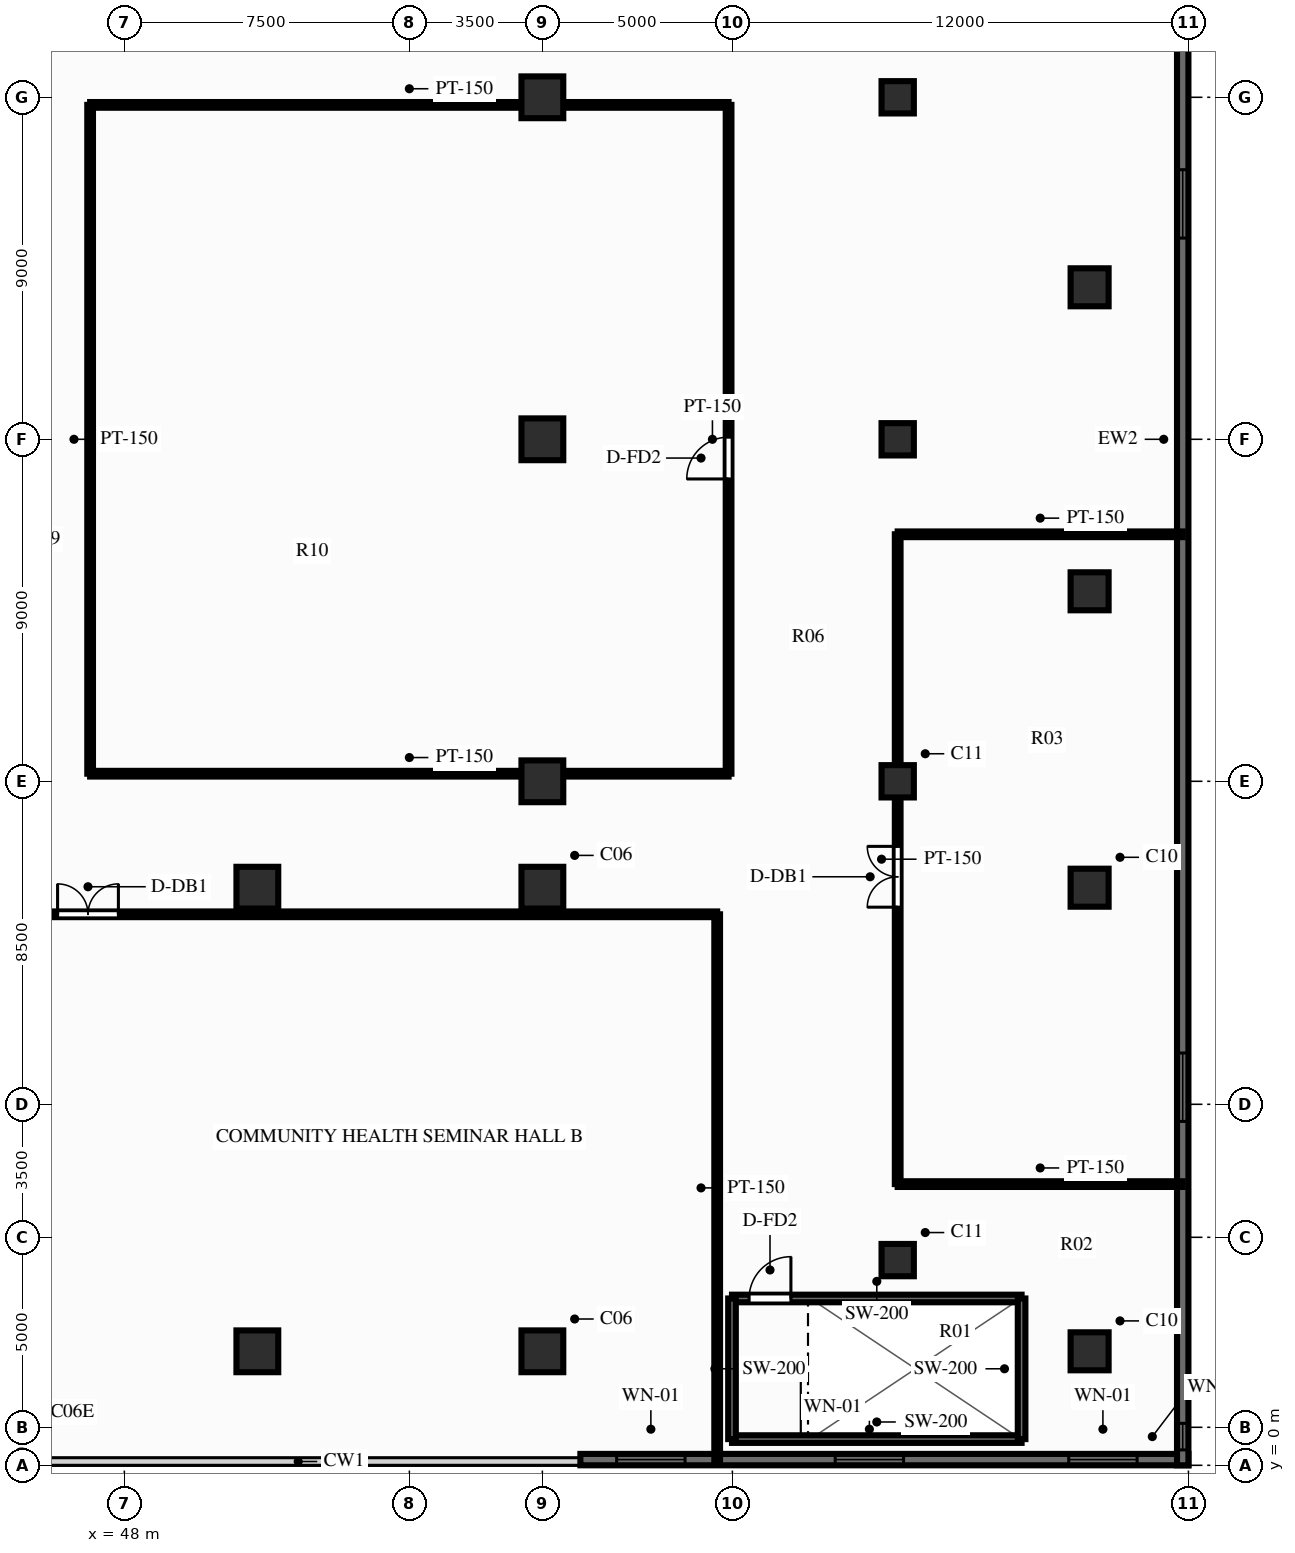
"""IFC4 building model, lengths in metres.
Left out: names, types, materials, properties, quantities, classifications, styles, units other than length and angle.
Written with IfcOpenShell. Run it as: python <this file> out.ifc"""

import sys

from ifc_helpers import new_model, si_unit, direction, frame, frame_2d, origin, origin_2d, place, context, subcontext, project, spatial, rectangle, circle, extrude, source, transform, mapped, element, fill, save


model = new_model("IFC4")
c1 = context("Model", 3, precision=1e-05, world=origin(), true_north=direction((0.0, 1.0)))
c2 = subcontext(c1, "Body", "Model", "MODEL_VIEW")
j1 = project(units=[si_unit("LENGTHUNIT", "METRE"), si_unit("PLANEANGLEUNIT", "RADIAN")], contexts=[c1])
p1 = place(None, origin())
s1 = spatial("IfcSite", under=j1, at=p1, CompositionType="ELEMENT")
p2 = place(p1, origin())
s2 = spatial("IfcBuilding", under=s1, at=p2, CompositionType="ELEMENT")
p3 = place(p2, frame((0.0, 0.0, 15.0)))
s3 = spatial("IfcBuildingStorey", under=s2, at=p3, CompositionType="ELEMENT", Elevation=15.0)
m1 = source(origin(), c2, "Body", "SweptSolid", [
    extrude(circle(Radius=0.5, at=origin_2d()), origin(), (0.0, 0.0, 1.0), 4.4),
])
for number, where, z_axis, x_axis in (
    (1, (73.4, 3.0, 0.0), (0.0, 0.0, 1.0), (1.0, 0.0, 0.0)),
    (2, (73.4, 15.2, 0.0), (0.0, 0.0, 1.0), (1.0, 0.0, 0.0)),
    (3, (73.4, 23.0, 0.0), (0.0, 0.0, 1.0), (1.0, 0.0, 0.0)),
    (4, (73.4, 31.0, 0.0), (0.0, 0.0, 1.0), (1.0, 0.0, 0.0)),
):
    element("IfcColumn", number, at=place(p3, frame(where, z_axis=z_axis, x_axis=x_axis)), inside=s3, PredefinedType="COLUMN", context=c2, shape_type="MappedRepresentation", body=[
        mapped(m1, transform((0.0, 0.0, 0.0), scale=1.0)),
    ])
m2 = source(origin(), c2, "Body", "SweptSolid", [
    extrude(circle(Radius=0.425, at=origin_2d()), origin(), (0.0, 0.0, 1.0), 4.4),
])
for number, where, z_axis, x_axis in (
    (5, (68.35, 5.4, 0.0), (0.0, 0.0, 1.0), (1.0, 0.0, 0.0)),
    (6, (68.35, 18.0, 0.0), (0.0, 0.0, 1.0), (1.0, 0.0, 0.0)),
    (7, (68.35, 27.0, 0.0), (0.0, 0.0, 1.0), (1.0, 0.0, 0.0)),
    (8, (68.35, 36.0, 0.0), (0.0, 0.0, 1.0), (1.0, 0.0, 0.0)),
):
    element("IfcColumn", number, at=place(p3, frame(where, z_axis=z_axis, x_axis=x_axis)), inside=s3, PredefinedType="COLUMN", context=c2, shape_type="MappedRepresentation", body=[
        mapped(m2, transform((0.0, 0.0, 0.0), scale=1.0)),
    ])
m3 = source(origin(), c2, "Body", "SweptSolid", [
    extrude(rectangle(XDim=1.1, YDim=1.1, at=origin_2d()), origin(), (0.0, 0.0, 1.0), 4.4),
])
for number, where, z_axis, x_axis in (
    (9, (59.0, 3.0, 0.0), (0.0, 0.0, 1.0), (1.0, 0.0, 0.0)),
    (10, (59.0, 15.2, 0.0), (0.0, 0.0, 1.0), (1.0, 0.0, 0.0)),
    (11, (59.0, 18.0, 0.0), (0.0, 0.0, 1.0), (1.0, 0.0, 0.0)),
    (12, (59.0, 27.0, 0.0), (0.0, 0.0, 1.0), (1.0, 0.0, 0.0)),
    (13, (59.0, 36.0, 0.0), (0.0, 0.0, 1.0), (1.0, 0.0, 0.0)),
    (14, (51.5, 3.0, 0.0), (0.0, 0.0, 1.0), (1.0, 0.0, 0.0)),
    (15, (51.5, 15.2, 0.0), (0.0, 0.0, 1.0), (1.0, 0.0, 0.0)),
):
    element("IfcColumn", number, at=place(p3, frame(where, z_axis=z_axis, x_axis=x_axis)), inside=s3, PredefinedType="COLUMN", context=c2, shape_type="MappedRepresentation", body=[
        mapped(m3, transform((0.0, 0.0, 0.0), scale=1.0)),
    ])
p4 = place(p3, frame((60.0, 0.15, 0.0), z_axis=(0.0, 0.0, 1.0), x_axis=(1.0, 0.0, 0.0)))
e16 = element("IfcWall", 16, at=p4, inside=s3, PredefinedType="SOLIDWALL", context=c2, shape_type="SweptSolid", body=[
    extrude(rectangle(XDim=16.0, YDim=0.3, at=frame_2d((8.0, 0.0))), origin(), (0.0, 0.0, 1.0), 2.98),
])
p5 = place(p4, frame((0.955, 0.0, 0.85)))
e17 = element("IfcOpeningElement", 17, at=p5, cuts=e16, PredefinedType="OPENING", context=c2, shape_type="SweptSolid", body=[
    extrude(rectangle(XDim=1.8, YDim=1.65, at=frame_2d((0.9, 0.825))), frame((0.0, 0.162, 0.0), z_axis=(0.0, -1.0, 0.0), x_axis=(1.0, 0.0, 0.0)), (0.0, 0.0, 1.0), 0.324),
])
p6 = place(p4, frame((6.705, 0.0, 0.85)))
e18 = element("IfcOpeningElement", 18, at=p6, cuts=e16, PredefinedType="OPENING", context=c2, shape_type="SweptSolid", body=[
    extrude(rectangle(XDim=1.8, YDim=1.65, at=frame_2d((0.9, 0.825))), frame((0.0, 0.162, 0.0), z_axis=(0.0, -1.0, 0.0), x_axis=(1.0, 0.0, 0.0)), (0.0, 0.0, 1.0), 0.324),
])
p7 = place(p4, frame((12.85, 0.0, 0.85)))
e19 = element("IfcOpeningElement", 19, at=p7, cuts=e16, PredefinedType="OPENING", context=c2, shape_type="SweptSolid", body=[
    extrude(rectangle(XDim=1.8, YDim=1.65, at=frame_2d((0.9, 0.825))), frame((0.0, 0.162, 0.0), z_axis=(0.0, -1.0, 0.0), x_axis=(1.0, 0.0, 0.0)), (0.0, 0.0, 1.0), 0.324),
])
p8 = place(p3, frame((75.85, 0.0, 0.0), z_axis=(0.0, 0.0, 1.0), x_axis=(0.0, 1.0, 0.0)))
e20 = element("IfcWall", 20, at=p8, inside=s3, PredefinedType="SOLIDWALL", context=c2, shape_type="SweptSolid", body=[
    extrude(rectangle(XDim=54.0, YDim=0.3, at=frame_2d((27.0, 0.0))), origin(), (0.0, 0.0, 1.0), 2.98),
])
p9 = place(p8, frame((0.405, 0.0, 0.85)))
e21 = element("IfcOpeningElement", 21, at=p9, cuts=e20, PredefinedType="OPENING", context=c2, shape_type="SweptSolid", body=[
    extrude(rectangle(XDim=0.7, YDim=1.5, at=frame_2d((0.35, 0.75))), frame((0.0, 0.162, 0.0), z_axis=(0.0, -1.0, 0.0), x_axis=(1.0, 0.0, 0.0)), (0.0, 0.0, 1.0), 0.324),
])
p10 = place(p8, frame((9.05, 0.0, 0.85)))
e22 = element("IfcOpeningElement", 22, at=p10, cuts=e20, PredefinedType="OPENING", context=c2, shape_type="SweptSolid", body=[
    extrude(rectangle(XDim=1.8, YDim=1.65, at=frame_2d((0.9, 0.825))), frame((0.0, 0.162, 0.0), z_axis=(0.0, -1.0, 0.0), x_axis=(1.0, 0.0, 0.0)), (0.0, 0.0, 1.0), 0.324),
])
p11 = place(p8, frame((32.295, 0.0, 0.85)))
e23 = element("IfcOpeningElement", 23, at=p11, cuts=e20, PredefinedType="OPENING", context=c2, shape_type="SweptSolid", body=[
    extrude(rectangle(XDim=1.8, YDim=1.65, at=frame_2d((0.9, 0.825))), frame((0.0, 0.162, 0.0), z_axis=(0.0, -1.0, 0.0), x_axis=(1.0, 0.0, 0.0)), (0.0, 0.0, 1.0), 0.324),
])
p12 = place(p3, frame((63.99, 0.69, 0.0), z_axis=(0.0, 0.0, 1.0), x_axis=(1.0, 0.0, 0.0)))
e24 = element("IfcWall", 24, at=p12, inside=s3, PredefinedType="SOLIDWALL", context=c2, shape_type="SweptSolid", body=[
    extrude(rectangle(XDim=7.62, YDim=0.2, at=frame_2d((3.81, 0.0))), origin(), (0.0, 0.0, 1.0), 4.19),
])
p13 = place(p3, frame((63.99, 4.39, 0.0), z_axis=(0.0, 0.0, 1.0), x_axis=(1.0, 0.0, 0.0)))
e25 = element("IfcWall", 25, at=p13, inside=s3, PredefinedType="SOLIDWALL", context=c2, shape_type="SweptSolid", body=[
    extrude(rectangle(XDim=7.62, YDim=0.2, at=frame_2d((3.81, 0.0))), origin(), (0.0, 0.0, 1.0), 4.19),
])
p14 = place(p13, frame((0.45, 0.0, 0.0)))
e26 = element("IfcOpeningElement", 26, at=p14, cuts=e25, PredefinedType="OPENING", context=c2, shape_type="SweptSolid", body=[
    extrude(rectangle(XDim=1.1, YDim=2.15, at=frame_2d((0.55, 1.075))), frame((0.0, 0.112, 0.0), z_axis=(0.0, -1.0, 0.0), x_axis=(1.0, 0.0, 0.0)), (0.0, 0.0, 1.0), 0.224),
])
for number, where, z_axis, x_axis in (
    (27, (63.99, 0.69, 0.0), (0.0, 0.0, 1.0), (0.0, 1.0, 0.0)),
    (28, (71.61, 0.69, 0.0), (0.0, 0.0, 1.0), (0.0, 1.0, 0.0)),
):
    element("IfcWall", number, at=place(p3, frame(where, z_axis=z_axis, x_axis=x_axis)), inside=s3, PredefinedType="SOLIDWALL", context=c2, shape_type="SweptSolid", body=[
        extrude(rectangle(XDim=3.7, YDim=0.2, at=frame_2d((1.85, 0.0))), origin(), (0.0, 0.0, 1.0), 4.19),
    ])
p15 = place(p3, frame((32.3, 14.5, 0.0), z_axis=(0.0, 0.0, 1.0), x_axis=(1.0, 0.0, 0.0)))
e29 = element("IfcWall", 29, at=p15, inside=s3, PredefinedType="PARTITIONING", context=c2, shape_type="SweptSolid", body=[
    extrude(rectangle(XDim=31.3, YDim=0.15, at=frame_2d((15.65, 0.0))), origin(), (0.0, 0.0, 1.0), 4.08),
])
p16 = place(p15, frame((13.944, 0.0, 0.0)))
e30 = element("IfcOpeningElement", 30, at=p16, cuts=e29, PredefinedType="OPENING", context=c2, shape_type="SweptSolid", body=[
    extrude(rectangle(XDim=1.6, YDim=2.15, at=frame_2d((0.8, 1.075))), frame((0.0, 0.087, 0.0), z_axis=(0.0, -1.0, 0.0), x_axis=(1.0, 0.0, 0.0)), (0.0, 0.0, 1.0), 0.174),
])
p17 = place(p3, frame((63.6, 0.1, 0.0), z_axis=(0.0, 0.0, 1.0), x_axis=(0.0, 1.0, 0.0)))
e31 = element("IfcWall", 31, at=p17, inside=s3, PredefinedType="PARTITIONING", context=c2, shape_type="SweptSolid", body=[
    extrude(rectangle(XDim=14.4, YDim=0.15, at=frame_2d((7.2, 0.0))), origin(), (0.0, 0.0, 1.0), 2.94),
])
for number, where, z_axis, x_axis in (
    (32, (68.35, 7.4, 0.0), (0.0, 0.0, 1.0), (1.0, 0.0, 0.0)),
    (33, (68.35, 24.5, 0.0), (0.0, 0.0, 1.0), (1.0, 0.0, 0.0)),
):
    element("IfcWall", number, at=place(p3, frame(where, z_axis=z_axis, x_axis=x_axis)), inside=s3, PredefinedType="PARTITIONING", context=c2, shape_type="SweptSolid", body=[
        extrude(rectangle(XDim=7.5, YDim=0.15, at=frame_2d((3.75, 0.0))), origin(), (0.0, 0.0, 1.0), 4.08),
    ])
p18 = place(p3, frame((68.35, 7.4, 0.0), z_axis=(0.0, 0.0, 1.0), x_axis=(0.0, 1.0, 0.0)))
e34 = element("IfcWall", 34, at=p18, inside=s3, PredefinedType="PARTITIONING", context=c2, shape_type="SweptSolid", body=[
    extrude(rectangle(XDim=17.1, YDim=0.15, at=frame_2d((8.55, 0.0))), origin(), (0.0, 0.0, 1.0), 2.94),
])
p19 = place(p18, frame((7.288, 0.0, 0.0)))
e35 = element("IfcOpeningElement", 35, at=p19, cuts=e34, PredefinedType="OPENING", context=c2, shape_type="SweptSolid", body=[
    extrude(rectangle(XDim=1.6, YDim=2.15, at=frame_2d((0.8, 1.075))), frame((0.0, 0.087, 0.0), z_axis=(0.0, -1.0, 0.0), x_axis=(1.0, 0.0, 0.0)), (0.0, 0.0, 1.0), 0.174),
])
for number, where, z_axis, x_axis in (
    (36, (47.1, 18.2, 0.0), (0.0, 0.0, 1.0), (1.0, 0.0, 0.0)),
    (37, (47.1, 35.8, 0.0), (0.0, 0.0, 1.0), (1.0, 0.0, 0.0)),
):
    element("IfcWall", number, at=place(p3, frame(where, z_axis=z_axis, x_axis=x_axis)), inside=s3, PredefinedType="PARTITIONING", context=c2, shape_type="SweptSolid", body=[
        extrude(rectangle(XDim=16.8, YDim=0.15, at=frame_2d((8.4, 0.0))), origin(), (0.0, 0.0, 1.0), 4.08),
    ])
p20 = place(p3, frame((47.1, 18.2, 0.0), z_axis=(0.0, 0.0, 1.0), x_axis=(0.0, 1.0, 0.0)))
e38 = element("IfcWall", 38, at=p20, inside=s3, PredefinedType="PARTITIONING", context=c2, shape_type="SweptSolid", body=[
    extrude(rectangle(XDim=17.6, YDim=0.15, at=frame_2d((8.8, 0.0))), origin(), (0.0, 0.0, 1.0), 4.08),
])
p21 = place(p3, frame((63.9, 18.2, 0.0), z_axis=(0.0, 0.0, 1.0), x_axis=(0.0, 1.0, 0.0)))
e39 = element("IfcWall", 39, at=p21, inside=s3, PredefinedType="PARTITIONING", context=c2, shape_type="SweptSolid", body=[
    extrude(rectangle(XDim=17.6, YDim=0.15, at=frame_2d((8.8, 0.0))), origin(), (0.0, 0.0, 1.0), 4.08),
])
p22 = place(p21, frame((7.756, 0.0, 0.0)))
e40 = element("IfcOpeningElement", 40, at=p22, cuts=e39, PredefinedType="OPENING", context=c2, shape_type="SweptSolid", body=[
    extrude(rectangle(XDim=1.1, YDim=2.15, at=frame_2d((0.55, 1.075))), frame((0.0, 0.087, 0.0), z_axis=(0.0, -1.0, 0.0), x_axis=(1.0, 0.0, 0.0)), (0.0, 0.0, 1.0), 0.174),
])
m4 = source(origin(), c2, "Body", "SweptSolid", [
    extrude(rectangle(XDim=1.8, YDim=1.65, at=frame_2d((0.9, 0.825))), frame((0.0, 0.03, 0.0), z_axis=(0.0, -1.0, 0.0), x_axis=(1.0, 0.0, 0.0)), (0.0, 0.0, 1.0), 0.06),
])
p23 = place(p5, origin())
e41 = element("IfcWindow", 41, at=p23, inside=s3, PartitioningType="SINGLE_PANEL", PredefinedType="WINDOW", context=c2, shape_type="MappedRepresentation", body=[
    mapped(m4, transform((0.0, 0.0, 0.0), scale=1.0)),
])
fill(e17, e41)
p24 = place(p6, origin())
e42 = element("IfcWindow", 42, at=p24, inside=s3, PartitioningType="SINGLE_PANEL", PredefinedType="WINDOW", context=c2, shape_type="MappedRepresentation", body=[
    mapped(m4, transform((0.0, 0.0, 0.0), scale=1.0)),
])
fill(e18, e42)
p25 = place(p7, origin())
e43 = element("IfcWindow", 43, at=p25, inside=s3, PartitioningType="SINGLE_PANEL", PredefinedType="WINDOW", context=c2, shape_type="MappedRepresentation", body=[
    mapped(m4, transform((0.0, 0.0, 0.0), scale=1.0)),
])
fill(e19, e43)
m5 = source(origin(), c2, "Body", "SweptSolid", [
    extrude(rectangle(XDim=0.7, YDim=1.5, at=frame_2d((0.35, 0.75))), frame((0.0, 0.03, 0.0), z_axis=(0.0, -1.0, 0.0), x_axis=(1.0, 0.0, 0.0)), (0.0, 0.0, 1.0), 0.06),
])
p26 = place(p9, origin())
e44 = element("IfcWindow", 44, at=p26, inside=s3, PartitioningType="SINGLE_PANEL", PredefinedType="WINDOW", context=c2, shape_type="MappedRepresentation", body=[
    mapped(m5, transform((0.0, 0.0, 0.0), scale=1.0)),
])
fill(e21, e44)
p27 = place(p10, origin())
e45 = element("IfcWindow", 45, at=p27, inside=s3, PartitioningType="SINGLE_PANEL", PredefinedType="WINDOW", context=c2, shape_type="MappedRepresentation", body=[
    mapped(m4, transform((0.0, 0.0, 0.0), scale=1.0)),
])
fill(e22, e45)
p28 = place(p11, origin())
e46 = element("IfcWindow", 46, at=p28, inside=s3, PartitioningType="SINGLE_PANEL", PredefinedType="WINDOW", context=c2, shape_type="MappedRepresentation", body=[
    mapped(m4, transform((0.0, 0.0, 0.0), scale=1.0)),
])
fill(e23, e46)
m6 = source(origin(), c2, "Body", "SweptSolid", [
    extrude(rectangle(XDim=1.1, YDim=2.15, at=frame_2d((0.55, 1.075))), frame((0.0, 0.025, 0.0), z_axis=(0.0, -1.0, 0.0), x_axis=(1.0, 0.0, 0.0)), (0.0, 0.0, 1.0), 0.05),
])
p29 = place(p14, origin())
e47 = element("IfcDoor", 47, at=p29, inside=s3, OperationType="SINGLE_SWING_RIGHT", PredefinedType="DOOR", context=c2, shape_type="MappedRepresentation", body=[
    mapped(m6, transform((0.0, 0.0, 0.0), scale=1.0)),
])
fill(e26, e47)
m7 = source(origin(), c2, "Body", "SweptSolid", [
    extrude(rectangle(XDim=1.6, YDim=2.15, at=frame_2d((0.8, 1.075))), frame((0.0, 0.025, 0.0), z_axis=(0.0, -1.0, 0.0), x_axis=(1.0, 0.0, 0.0)), (0.0, 0.0, 1.0), 0.05),
])
p30 = place(p16, origin())
e48 = element("IfcDoor", 48, at=p30, inside=s3, OperationType="DOUBLE_SWING_LEFT", PredefinedType="DOOR", context=c2, shape_type="MappedRepresentation", body=[
    mapped(m7, transform((0.0, 0.0, 0.0), scale=1.0)),
])
fill(e30, e48)
p31 = place(p19, origin())
e49 = element("IfcDoor", 49, at=p31, inside=s3, OperationType="DOUBLE_SWING_LEFT", PredefinedType="DOOR", context=c2, shape_type="MappedRepresentation", body=[
    mapped(m7, transform((0.0, 0.0, 0.0), scale=1.0)),
])
fill(e35, e49)
p32 = place(p22, origin())
e50 = element("IfcDoor", 50, at=p32, inside=s3, OperationType="SINGLE_SWING_LEFT", PredefinedType="DOOR", context=c2, shape_type="MappedRepresentation", body=[
    mapped(m6, transform((0.0, 0.0, 0.0), scale=1.0)),
])
fill(e40, e50)
save(model, sys.argv[1])
